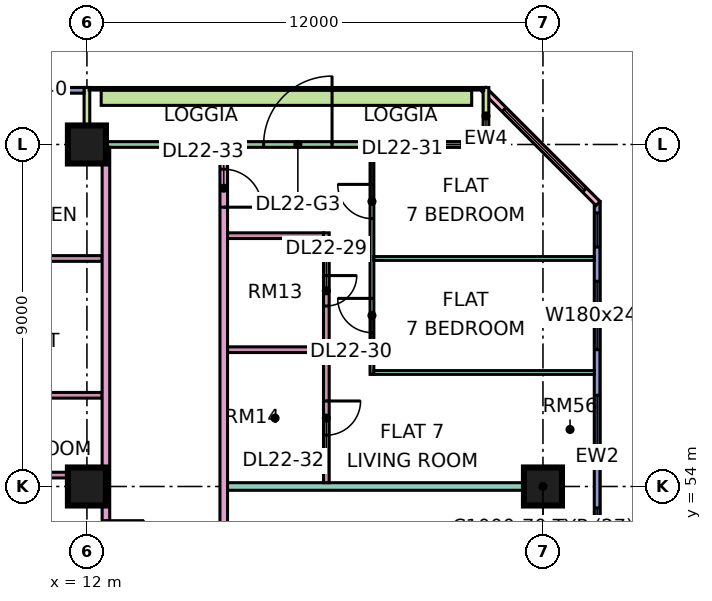
"""IFC4 building model, lengths in metres.
Left out: names, types, materials, properties, quantities, classifications, styles, units other than length and angle.
Written with IfcOpenShell. Run it as: python <this file> out.ifc"""

import sys

from ifc_helpers import new_model, si_unit, direction, frame, frame_2d, origin, origin_2d, place, context, subcontext, project, spatial, rectangle, extrude, element, fill, save


model = new_model("IFC4")
c1 = context("Model", 3, precision=1e-05, world=origin(), true_north=direction((0.0, 1.0)))
c2 = subcontext(c1, "Body", "Model", "MODEL_VIEW")
j1 = project(units=[si_unit("LENGTHUNIT", "METRE"), si_unit("PLANEANGLEUNIT", "RADIAN")], contexts=[c1])
p1 = place(None, origin())
s1 = spatial("IfcSite", under=j1, at=p1, CompositionType="ELEMENT")
p2 = place(p1, origin())
s2 = spatial("IfcBuilding", under=s1, at=p2, CompositionType="ELEMENT")
p3 = place(p2, frame((0.0, 0.0, 99.4)))
s3 = spatial("IfcBuildingStorey", under=s2, at=p3, CompositionType="ELEMENT", Elevation=99.4)
for number, where, z_axis, x_axis in (
    (1, (12.0, 54.0, 0.0), (0.0, 0.0, 1.0), (1.0, 0.0, 0.0)),
    (2, (12.0, 63.0, 0.0), (0.0, 0.0, 1.0), (1.0, 0.0, 0.0)),
    (3, (24.0, 54.0, 0.0), (0.0, 0.0, 1.0), (1.0, 0.0, 0.0)),
):
    element("IfcColumn", number, at=place(p3, frame(where, z_axis=z_axis, x_axis=x_axis)), inside=s3, PredefinedType="COLUMN", context=c2, shape_type="SweptSolid", body=[
        extrude(rectangle(XDim=1.0, YDim=1.0, at=origin_2d()), origin(), (0.0, 0.0, 1.0), 3.75),
    ])
p4 = place(p3, frame((25.425, 48.075, 0.0), z_axis=(0.0, 0.0, 1.0), x_axis=(0.0, 1.0, 0.0)))
e4 = element("IfcWall", 4, at=p4, inside=s3, PredefinedType="SOLIDWALL", context=c2, shape_type="SweptSolid", body=[
    extrude(rectangle(XDim=13.425, YDim=0.15, at=frame_2d((6.712, 0.0))), origin(), (0.0, 0.0, 1.0), 3.35),
])
p5 = place(p4, frame((0.562, 0.0, 0.45)))
e5 = element("IfcOpeningElement", 5, at=p5, cuts=e4, PredefinedType="OPENING", context=c2, shape_type="SweptSolid", body=[
    extrude(rectangle(XDim=4.8, YDim=2.4, at=frame_2d((2.4, 1.2))), frame((0.0, 0.085, 0.0), z_axis=(0.0, -1.0, 0.0), x_axis=(1.0, 0.0, 0.0)), (0.0, 0.0, 1.0), 0.17),
])
p6 = place(p4, frame((6.525, 0.0, 0.45)))
e6 = element("IfcOpeningElement", 6, at=p6, cuts=e4, PredefinedType="OPENING", context=c2, shape_type="SweptSolid", body=[
    extrude(rectangle(XDim=1.8, YDim=2.4, at=frame_2d((0.9, 1.2))), frame((0.0, 0.085, 0.0), z_axis=(0.0, -1.0, 0.0), x_axis=(1.0, 0.0, 0.0)), (0.0, 0.0, 1.0), 0.17),
])
p7 = place(p4, frame((9.525, 0.0, 0.45)))
e7 = element("IfcOpeningElement", 7, at=p7, cuts=e4, PredefinedType="OPENING", context=c2, shape_type="SweptSolid", body=[
    extrude(rectangle(XDim=1.8, YDim=2.4, at=frame_2d((0.9, 1.2))), frame((0.0, 0.085, 0.0), z_axis=(0.0, -1.0, 0.0), x_axis=(1.0, 0.0, 0.0)), (0.0, 0.0, 1.0), 0.17),
])
p8 = place(p4, frame((12.225, 0.0, 0.45)))
e8 = element("IfcOpeningElement", 8, at=p8, cuts=e4, PredefinedType="OPENING", context=c2, shape_type="SweptSolid", body=[
    extrude(rectangle(XDim=0.9, YDim=2.4, at=frame_2d((0.45, 1.2))), frame((0.0, 0.085, 0.0), z_axis=(0.0, -1.0, 0.0), x_axis=(1.0, 0.0, 0.0)), (0.0, 0.0, 1.0), 0.17),
])
p9 = place(p3, frame((25.447, 61.447, 0.0), z_axis=(0.0, 0.0, 1.0), x_axis=(-0.707106781187, 0.707106781187, 0.0)))
e9 = element("IfcWall", 9, at=p9, inside=s3, PredefinedType="SOLIDWALL", context=c2, shape_type="SweptSolid", body=[
    extrude(rectangle(XDim=4.243, YDim=0.15, at=frame_2d((2.121, 0.0))), origin(), (0.0, 0.0, 1.0), 3.35),
])
p10 = place(p9, frame((0.498, 0.0, 0.45)))
e10 = element("IfcOpeningElement", 10, at=p10, cuts=e9, PredefinedType="OPENING", context=c2, shape_type="SweptSolid", body=[
    extrude(rectangle(XDim=3.0, YDim=2.4, at=frame_2d((1.5, 1.2))), frame((0.0, 0.085, 0.0), z_axis=(0.0, -1.0, 0.0), x_axis=(1.0, 0.0, 0.0)), (0.0, 0.0, 1.0), 0.17),
])
p11 = place(p3, frame((22.425, 63.0, 0.0), z_axis=(0.0, 0.0, 1.0), x_axis=(-1.0, 0.0, 0.0)))
e11 = element("IfcWall", 11, at=p11, inside=s3, PredefinedType="SOLIDWALL", context=c2, shape_type="SweptSolid", body=[
    extrude(rectangle(XDim=10.35, YDim=0.15, at=frame_2d((5.175, 0.0))), origin(), (0.0, 0.0, 1.0), 3.35),
])
p12 = place(p11, frame((0.562, 0.0, 0.45)))
e12 = element("IfcOpeningElement", 12, at=p12, cuts=e11, PredefinedType="OPENING", context=c2, shape_type="SweptSolid", body=[
    extrude(rectangle(XDim=1.8, YDim=2.4, at=frame_2d((0.9, 1.2))), frame((0.0, 0.085, 0.0), z_axis=(0.0, -1.0, 0.0), x_axis=(1.0, 0.0, 0.0)), (0.0, 0.0, 1.0), 0.17),
])
p13 = place(p11, frame((3.975, 0.0, 0.0)))
e13 = element("IfcOpeningElement", 13, at=p13, cuts=e11, PredefinedType="OPENING", context=c2, shape_type="SweptSolid", body=[
    extrude(rectangle(XDim=1.8, YDim=2.4, at=frame_2d((0.9, 1.2))), frame((0.0, 0.085, 0.0), z_axis=(0.0, -1.0, 0.0), x_axis=(1.0, 0.0, 0.0)), (0.0, 0.0, 1.0), 0.17),
])
for number, where, z_axis, x_axis in (
    (14, (22.5, 64.5, 0.0), (0.0, 0.0, 1.0), (0.0, -1.0, 0.0)),
    (15, (12.0, 64.5, 0.0), (0.0, 0.0, 1.0), (0.0, -1.0, 0.0)),
):
    element("IfcWall", number, at=place(p3, frame(where, z_axis=z_axis, x_axis=x_axis)), inside=s3, PredefinedType="SOLIDWALL", context=c2, shape_type="SweptSolid", body=[
        extrude(rectangle(XDim=1.5, YDim=0.15, at=frame_2d((0.75, 0.0))), origin(), (0.0, 0.0, 1.0), 3.35),
    ])
p14 = place(p3, frame((11.925, 64.425, 0.0), z_axis=(0.0, 0.0, 1.0), x_axis=(-1.0, 0.0, 0.0)))
e16 = element("IfcWall", 16, at=p14, inside=s3, PredefinedType="SOLIDWALL", context=c2, shape_type="SweptSolid", body=[
    extrude(rectangle(XDim=10.425, YDim=0.15, at=frame_2d((5.212, 0.0))), origin(), (0.0, 0.0, 1.0), 3.35),
])
p15 = place(p14, frame((0.613, 0.0, 0.45)))
e17 = element("IfcOpeningElement", 17, at=p15, cuts=e16, PredefinedType="OPENING", context=c2, shape_type="SweptSolid", body=[
    extrude(rectangle(XDim=2.4, YDim=2.4, at=frame_2d((1.2, 1.2))), frame((0.0, 0.085, 0.0), z_axis=(0.0, -1.0, 0.0), x_axis=(1.0, 0.0, 0.0)), (0.0, 0.0, 1.0), 0.17),
])
p16 = place(p14, frame((6.125, 0.0, 0.45)))
e18 = element("IfcOpeningElement", 18, at=p16, cuts=e16, PredefinedType="OPENING", context=c2, shape_type="SweptSolid", body=[
    extrude(rectangle(XDim=3.0, YDim=2.4, at=frame_2d((1.5, 1.2))), frame((0.0, 0.085, 0.0), z_axis=(0.0, -1.0, 0.0), x_axis=(1.0, 0.0, 0.0)), (0.0, 0.0, 1.0), 0.17),
])
p17 = place(p3, frame((22.125, 64.229, 0.0), z_axis=(0.0, 0.0, 1.0), x_axis=(-1.0, 0.0, 0.0)))
e19 = element("IfcWall", 19, at=p17, inside=s3, PredefinedType="SOLIDWALL", context=c2, shape_type="SweptSolid", body=[
    extrude(rectangle(XDim=9.75, YDim=0.4, at=frame_2d((4.875, 0.0))), origin(), (0.0, 0.0, 1.0), 0.7),
])
p18 = place(p3, frame((8.375, 54.3, 0.0), z_axis=(0.0, 0.0, 1.0), x_axis=(1.0, 0.0, 0.0)))
e20 = element("IfcWall", 20, at=p18, inside=s3, PredefinedType="PARTITIONING", context=c2, shape_type="SweptSolid", body=[
    extrude(rectangle(XDim=4.025, YDim=0.15, at=frame_2d((2.012, 0.0))), origin(), (0.0, 0.0, 1.0), 3.35),
])
p19 = place(p18, frame((1.675, 0.0, 0.0)))
e21 = element("IfcOpeningElement", 21, at=p19, cuts=e20, PredefinedType="OPENING", context=c2, shape_type="SweptSolid", body=[
    extrude(rectangle(XDim=0.8, YDim=2.1, at=frame_2d((0.4, 1.05))), frame((0.0, 0.085, 0.0), z_axis=(0.0, -1.0, 0.0), x_axis=(1.0, 0.0, 0.0)), (0.0, 0.0, 1.0), 0.17),
])
for number, where, z_axis, x_axis in (
    (22, (8.375, 56.4, 0.0), (0.0, 0.0, 1.0), (1.0, 0.0, 0.0)),
    (23, (8.375, 60.0, 0.0), (0.0, 0.0, 1.0), (1.0, 0.0, 0.0)),
):
    element("IfcWall", number, at=place(p3, frame(where, z_axis=z_axis, x_axis=x_axis)), inside=s3, PredefinedType="PARTITIONING", context=c2, shape_type="SweptSolid", body=[
        extrude(rectangle(XDim=4.025, YDim=0.15, at=frame_2d((2.012, 0.0))), origin(), (0.0, 0.0, 1.0), 3.35),
    ])
p20 = place(p3, frame((12.5, 20.0, 0.0), z_axis=(0.0, 0.0, 1.0), x_axis=(0.0, 1.0, 0.0)))
e24 = element("IfcWall", 24, at=p20, inside=s3, PredefinedType="PARTITIONING", context=c2, shape_type="SweptSolid", body=[
    extrude(rectangle(XDim=42.926, YDim=0.2, at=frame_2d((21.463, 0.0))), origin(), (0.0, 0.0, 1.0), 3.35),
])
p21 = place(p20, frame((28.65, 0.0, 0.0)))
e25 = element("IfcOpeningElement", 25, at=p21, cuts=e24, PredefinedType="OPENING", context=c2, shape_type="SweptSolid", body=[
    extrude(rectangle(XDim=1.0, YDim=2.1, at=frame_2d((0.5, 1.05))), frame((0.0, 0.11, 0.0), z_axis=(0.0, -1.0, 0.0), x_axis=(1.0, 0.0, 0.0)), (0.0, 0.0, 1.0), 0.22),
])
p22 = place(p20, frame((32.1, 0.0, 0.0)))
e26 = element("IfcOpeningElement", 26, at=p22, cuts=e24, PredefinedType="OPENING", context=c2, shape_type="SweptSolid", body=[
    extrude(rectangle(XDim=1.0, YDim=2.1, at=frame_2d((0.5, 1.05))), frame((0.0, 0.11, 0.0), z_axis=(0.0, -1.0, 0.0), x_axis=(1.0, 0.0, 0.0)), (0.0, 0.0, 1.0), 0.22),
])
p23 = place(p20, frame((0.6, 0.0, 0.0)))
e27 = element("IfcOpeningElement", 27, at=p23, cuts=e24, PredefinedType="OPENING", context=c2, shape_type="SweptSolid", body=[
    extrude(rectangle(XDim=1.2, YDim=2.1, at=frame_2d((0.6, 1.05))), frame((0.0, 0.11, 0.0), z_axis=(0.0, -1.0, 0.0), x_axis=(1.0, 0.0, 0.0)), (0.0, 0.0, 1.0), 0.22),
])
p24 = place(p20, frame((13.95, 0.0, 0.0)))
e28 = element("IfcOpeningElement", 28, at=p24, cuts=e24, PredefinedType="OPENING", context=c2, shape_type="SweptSolid", body=[
    extrude(rectangle(XDim=1.0, YDim=2.1, at=frame_2d((0.5, 1.05))), frame((0.0, 0.11, 0.0), z_axis=(0.0, -1.0, 0.0), x_axis=(1.0, 0.0, 0.0)), (0.0, 0.0, 1.0), 0.22),
])
p25 = place(p3, frame((15.6, 51.225, 0.0), z_axis=(0.0, 0.0, 1.0), x_axis=(0.0, 1.0, 0.0)))
e29 = element("IfcWall", 29, at=p25, inside=s3, PredefinedType="PARTITIONING", context=c2, shape_type="SweptSolid", body=[
    extrude(rectangle(XDim=11.701, YDim=0.2, at=frame_2d((5.851, 0.0))), origin(), (0.0, 0.0, 1.0), 3.35),
])
p26 = place(p25, frame((10.125, 0.0, 0.0)))
e30 = element("IfcOpeningElement", 30, at=p26, cuts=e29, PredefinedType="OPENING", context=c2, shape_type="SweptSolid", body=[
    extrude(rectangle(XDim=1.0, YDim=2.1, at=frame_2d((0.5, 1.05))), frame((0.0, 0.11, 0.0), z_axis=(0.0, -1.0, 0.0), x_axis=(1.0, 0.0, 0.0)), (0.0, 0.0, 1.0), 0.22),
])
p27 = place(p3, frame((15.7, 54.0, 0.0), z_axis=(0.0, 0.0, 1.0), x_axis=(1.0, 0.0, 0.0)))
e31 = element("IfcWall", 31, at=p27, inside=s3, PredefinedType="PARTITIONING", context=c2, shape_type="SweptSolid", body=[
    extrude(rectangle(XDim=8.3, YDim=0.2, at=frame_2d((4.15, 0.0))), origin(), (0.0, 0.0, 1.0), 3.35),
])
for number, where, z_axis, x_axis in (
    (32, (15.7, 57.6, 0.0), (0.0, 0.0, 1.0), (1.0, 0.0, 0.0)),
    (33, (15.7, 60.6, 0.0), (0.0, 0.0, 1.0), (1.0, 0.0, 0.0)),
):
    element("IfcWall", number, at=place(p3, frame(where, z_axis=z_axis, x_axis=x_axis)), inside=s3, PredefinedType="PARTITIONING", context=c2, shape_type="SweptSolid", body=[
        extrude(rectangle(XDim=2.525, YDim=0.15, at=frame_2d((1.263, 0.0))), origin(), (0.0, 0.0, 1.0), 3.35),
    ])
p28 = place(p3, frame((18.3, 54.1, 0.0), z_axis=(0.0, 0.0, 1.0), x_axis=(0.0, 1.0, 0.0)))
e34 = element("IfcWall", 34, at=p28, inside=s3, PredefinedType="PARTITIONING", context=c2, shape_type="SweptSolid", body=[
    extrude(rectangle(XDim=6.575, YDim=0.15, at=frame_2d((3.288, 0.0))), origin(), (0.0, 0.0, 1.0), 3.35),
])
p29 = place(p28, frame((4.65, 0.0, 0.0)))
e35 = element("IfcOpeningElement", 35, at=p29, cuts=e34, PredefinedType="OPENING", context=c2, shape_type="SweptSolid", body=[
    extrude(rectangle(XDim=0.8, YDim=2.1, at=frame_2d((0.4, 1.05))), frame((0.0, 0.085, 0.0), z_axis=(0.0, -1.0, 0.0), x_axis=(1.0, 0.0, 0.0)), (0.0, 0.0, 1.0), 0.17),
])
p30 = place(p28, frame((1.25, 0.0, 0.0)))
e36 = element("IfcOpeningElement", 36, at=p30, cuts=e34, PredefinedType="OPENING", context=c2, shape_type="SweptSolid", body=[
    extrude(rectangle(XDim=0.9, YDim=2.1, at=frame_2d((0.45, 1.05))), frame((0.0, 0.085, 0.0), z_axis=(0.0, -1.0, 0.0), x_axis=(1.0, 0.0, 0.0)), (0.0, 0.0, 1.0), 0.17),
])
p31 = place(p3, frame((19.5, 56.95, 0.0), z_axis=(0.0, 0.0, 1.0), x_axis=(0.0, 1.0, 0.0)))
e37 = element("IfcWall", 37, at=p31, inside=s3, PredefinedType="PARTITIONING", context=c2, shape_type="SweptSolid", body=[
    extrude(rectangle(XDim=5.976, YDim=0.1, at=frame_2d((2.988, 0.0))), origin(), (0.0, 0.0, 1.0), 3.35),
])
p32 = place(p31, frame((1.1, 0.0, 0.0)))
e38 = element("IfcOpeningElement", 38, at=p32, cuts=e37, PredefinedType="OPENING", context=c2, shape_type="SweptSolid", body=[
    extrude(rectangle(XDim=0.9, YDim=2.1, at=frame_2d((0.45, 1.05))), frame((0.0, 0.06, 0.0), z_axis=(0.0, -1.0, 0.0), x_axis=(1.0, 0.0, 0.0)), (0.0, 0.0, 1.0), 0.12),
])
p33 = place(p31, frame((4.1, 0.0, 0.0)))
e39 = element("IfcOpeningElement", 39, at=p33, cuts=e37, PredefinedType="OPENING", context=c2, shape_type="SweptSolid", body=[
    extrude(rectangle(XDim=0.9, YDim=2.1, at=frame_2d((0.45, 1.05))), frame((0.0, 0.06, 0.0), z_axis=(0.0, -1.0, 0.0), x_axis=(1.0, 0.0, 0.0)), (0.0, 0.0, 1.0), 0.12),
])
p34 = place(p3, frame((19.55, 57.0, 0.0), z_axis=(0.0, 0.0, 1.0), x_axis=(1.0, 0.0, 0.0)))
e40 = element("IfcWall", 40, at=p34, inside=s3, PredefinedType="PARTITIONING", context=c2, shape_type="SweptSolid", body=[
    extrude(rectangle(XDim=5.8, YDim=0.1, at=frame_2d((2.9, 0.0))), origin(), (0.0, 0.0, 1.0), 3.35),
])
p35 = place(p3, frame((19.55, 60.0, 0.0), z_axis=(0.0, 0.0, 1.0), x_axis=(1.0, 0.0, 0.0)))
e41 = element("IfcWall", 41, at=p35, inside=s3, PredefinedType="PARTITIONING", context=c2, shape_type="SweptSolid", body=[
    extrude(rectangle(XDim=5.801, YDim=0.1, at=frame_2d((2.9, 0.0))), origin(), (0.0, 0.0, 1.0), 3.35),
])
p36 = place(p5, origin())
e42 = element("IfcWindow", 42, at=p36, inside=s3, PartitioningType="SINGLE_PANEL", PredefinedType="WINDOW", context=c2, shape_type="SweptSolid", body=[
    extrude(rectangle(XDim=4.8, YDim=2.4, at=frame_2d((2.4, 1.2))), frame((0.0, 0.03, 0.0), z_axis=(0.0, -1.0, 0.0), x_axis=(1.0, 0.0, 0.0)), (0.0, 0.0, 1.0), 0.06),
])
fill(e5, e42)
p37 = place(p6, origin())
e43 = element("IfcWindow", 43, at=p37, inside=s3, PartitioningType="SINGLE_PANEL", PredefinedType="WINDOW", context=c2, shape_type="SweptSolid", body=[
    extrude(rectangle(XDim=1.8, YDim=2.4, at=frame_2d((0.9, 1.2))), frame((0.0, 0.03, 0.0), z_axis=(0.0, -1.0, 0.0), x_axis=(1.0, 0.0, 0.0)), (0.0, 0.0, 1.0), 0.06),
])
fill(e6, e43)
p38 = place(p7, origin())
e44 = element("IfcWindow", 44, at=p38, inside=s3, PartitioningType="SINGLE_PANEL", PredefinedType="WINDOW", context=c2, shape_type="SweptSolid", body=[
    extrude(rectangle(XDim=1.8, YDim=2.4, at=frame_2d((0.9, 1.2))), frame((0.0, 0.03, 0.0), z_axis=(0.0, -1.0, 0.0), x_axis=(1.0, 0.0, 0.0)), (0.0, 0.0, 1.0), 0.06),
])
fill(e7, e44)
p39 = place(p8, origin())
e45 = element("IfcWindow", 45, at=p39, inside=s3, PartitioningType="SINGLE_PANEL", PredefinedType="WINDOW", context=c2, shape_type="SweptSolid", body=[
    extrude(rectangle(XDim=0.9, YDim=2.4, at=frame_2d((0.45, 1.2))), frame((0.0, 0.03, 0.0), z_axis=(0.0, -1.0, 0.0), x_axis=(1.0, 0.0, 0.0)), (0.0, 0.0, 1.0), 0.06),
])
fill(e8, e45)
p40 = place(p10, origin())
e46 = element("IfcWindow", 46, at=p40, inside=s3, PartitioningType="SINGLE_PANEL", PredefinedType="WINDOW", context=c2, shape_type="SweptSolid", body=[
    extrude(rectangle(XDim=3.0, YDim=2.4, at=frame_2d((1.5, 1.2))), frame((0.0, 0.03, 0.0), z_axis=(0.0, -1.0, 0.0), x_axis=(1.0, 0.0, 0.0)), (0.0, 0.0, 1.0), 0.06),
])
fill(e10, e46)
p41 = place(p12, origin())
e47 = element("IfcWindow", 47, at=p41, inside=s3, PartitioningType="SINGLE_PANEL", PredefinedType="WINDOW", context=c2, shape_type="SweptSolid", body=[
    extrude(rectangle(XDim=1.8, YDim=2.4, at=frame_2d((0.9, 1.2))), frame((0.0, 0.03, 0.0), z_axis=(0.0, -1.0, 0.0), x_axis=(1.0, 0.0, 0.0)), (0.0, 0.0, 1.0), 0.06),
])
fill(e12, e47)
p42 = place(p13, frame((1.8, 0.0, 0.0), z_axis=(0.0, 0.0, 1.0), x_axis=(-1.0, 0.0, 0.0)))
e48 = element("IfcDoor", 48, at=p42, inside=s3, OperationType="DOUBLE_DOOR_SINGLE_SWING", PredefinedType="DOOR", context=c2, shape_type="SweptSolid", body=[
    extrude(rectangle(XDim=1.8, YDim=2.4, at=frame_2d((0.9, 1.2))), frame((0.0, 0.025, 0.0), z_axis=(0.0, -1.0, 0.0), x_axis=(1.0, 0.0, 0.0)), (0.0, 0.0, 1.0), 0.05),
])
fill(e13, e48)
p43 = place(p15, origin())
e49 = element("IfcWindow", 49, at=p43, inside=s3, PartitioningType="SINGLE_PANEL", PredefinedType="WINDOW", context=c2, shape_type="SweptSolid", body=[
    extrude(rectangle(XDim=2.4, YDim=2.4, at=frame_2d((1.2, 1.2))), frame((0.0, 0.03, 0.0), z_axis=(0.0, -1.0, 0.0), x_axis=(1.0, 0.0, 0.0)), (0.0, 0.0, 1.0), 0.06),
])
fill(e17, e49)
p44 = place(p29, origin())
e50 = element("IfcDoor", 50, at=p44, inside=s3, OperationType="SINGLE_SWING_RIGHT", PredefinedType="DOOR", context=c2, shape_type="SweptSolid", body=[
    extrude(rectangle(XDim=0.8, YDim=2.1, at=frame_2d((0.4, 1.05))), frame((0.0, 0.025, 0.0), z_axis=(0.0, -1.0, 0.0), x_axis=(1.0, 0.0, 0.0)), (0.0, 0.0, 1.0), 0.05),
])
fill(e35, e50)
p45 = place(p32, frame((0.9, 0.0, 0.0), z_axis=(0.0, 0.0, 1.0), x_axis=(-1.0, 0.0, 0.0)))
e51 = element("IfcDoor", 51, at=p45, inside=s3, OperationType="SINGLE_SWING_RIGHT", PredefinedType="DOOR", context=c2, shape_type="SweptSolid", body=[
    extrude(rectangle(XDim=0.9, YDim=2.1, at=frame_2d((0.45, 1.05))), frame((0.0, 0.025, 0.0), z_axis=(0.0, -1.0, 0.0), x_axis=(1.0, 0.0, 0.0)), (0.0, 0.0, 1.0), 0.05),
])
fill(e38, e51)
p46 = place(p33, frame((0.9, 0.0, 0.0), z_axis=(0.0, 0.0, 1.0), x_axis=(-1.0, 0.0, 0.0)))
e52 = element("IfcDoor", 52, at=p46, inside=s3, OperationType="SINGLE_SWING_RIGHT", PredefinedType="DOOR", context=c2, shape_type="SweptSolid", body=[
    extrude(rectangle(XDim=0.9, YDim=2.1, at=frame_2d((0.45, 1.05))), frame((0.0, 0.025, 0.0), z_axis=(0.0, -1.0, 0.0), x_axis=(1.0, 0.0, 0.0)), (0.0, 0.0, 1.0), 0.05),
])
fill(e39, e52)
p47 = place(p30, origin())
e53 = element("IfcDoor", 53, at=p47, inside=s3, OperationType="SINGLE_SWING_RIGHT", PredefinedType="DOOR", context=c2, shape_type="SweptSolid", body=[
    extrude(rectangle(XDim=0.9, YDim=2.1, at=frame_2d((0.45, 1.05))), frame((0.0, 0.025, 0.0), z_axis=(0.0, -1.0, 0.0), x_axis=(1.0, 0.0, 0.0)), (0.0, 0.0, 1.0), 0.05),
])
fill(e36, e53)
p48 = place(p26, frame((1.0, 0.0, 0.0), z_axis=(0.0, 0.0, 1.0), x_axis=(-1.0, 0.0, 0.0)))
e54 = element("IfcDoor", 54, at=p48, inside=s3, OperationType="SINGLE_SWING_LEFT", PredefinedType="DOOR", context=c2, shape_type="SweptSolid", body=[
    extrude(rectangle(XDim=1.0, YDim=2.1, at=frame_2d((0.5, 1.05))), frame((0.0, 0.025, 0.0), z_axis=(0.0, -1.0, 0.0), x_axis=(1.0, 0.0, 0.0)), (0.0, 0.0, 1.0), 0.05),
])
fill(e30, e54)
p49 = place(p22, origin())
e55 = element("IfcDoor", 55, at=p49, inside=s3, OperationType="SINGLE_SWING_RIGHT", PredefinedType="DOOR", context=c2, shape_type="SweptSolid", body=[
    extrude(rectangle(XDim=1.0, YDim=2.1, at=frame_2d((0.5, 1.05))), frame((0.0, 0.025, 0.0), z_axis=(0.0, -1.0, 0.0), x_axis=(1.0, 0.0, 0.0)), (0.0, 0.0, 1.0), 0.05),
])
fill(e26, e55)
save(model, sys.argv[1])
